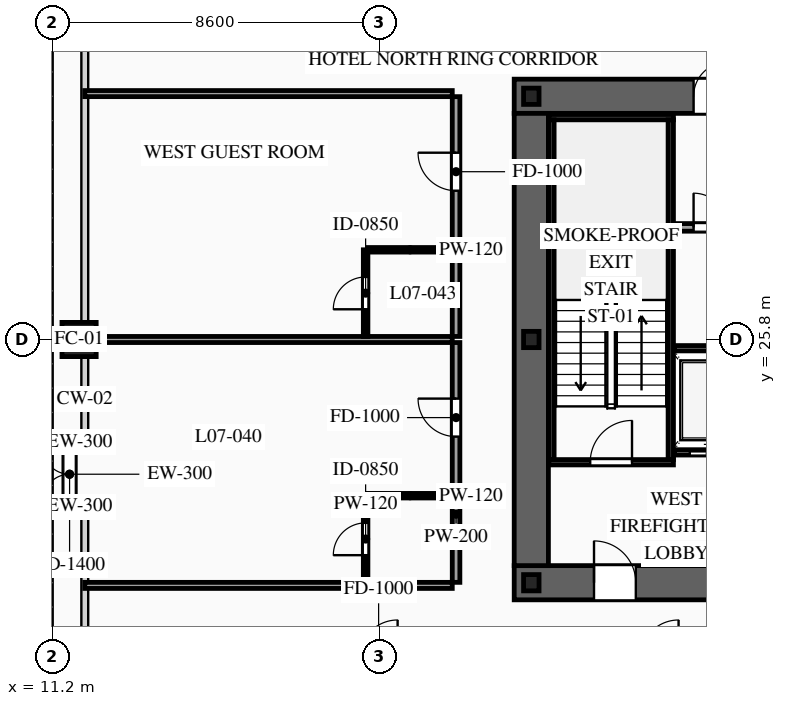
"""IFC4 building model, lengths in metres.
Left out: names, types, materials, properties, quantities, classifications, styles, units other than length and angle.
Written with IfcOpenShell. Run it as: python <this file> out.ifc"""

import sys

from ifc_helpers import new_model, si_unit, direction, frame, frame_2d, origin, origin_2d, place, context, subcontext, project, spatial, rectangle, hollow_rectangle, i_section, extrude, source, transform, mapped, element, fill, save


model = new_model("IFC4")
c1 = context("Model", 3, precision=1e-05, world=origin(), true_north=direction((0.0, 1.0)))
c2 = subcontext(c1, "Body", "Model", "MODEL_VIEW")
j1 = project(units=[si_unit("LENGTHUNIT", "METRE"), si_unit("PLANEANGLEUNIT", "RADIAN")], contexts=[c1])
p1 = place(None, origin())
s1 = spatial("IfcSite", under=j1, at=p1, CompositionType="ELEMENT")
p2 = place(p1, origin())
s2 = spatial("IfcBuilding", under=s1, at=p2, CompositionType="ELEMENT")
p3 = place(p2, frame((0.0, 0.0, 30.6)))
s3 = spatial("IfcBuildingStorey", under=s2, at=p3, CompositionType="ELEMENT", Elevation=30.6)
p4 = place(p3, frame((23.35, 19.4, 0.0), z_axis=(0.0, 0.0, 1.0), x_axis=(1.0, 0.0, 0.0)))
e1 = element("IfcWall", 1, at=p4, inside=s3, PredefinedType="SHEAR", context=c2, shape_type="SweptSolid", body=[
    extrude(rectangle(XDim=27.3, YDim=0.9, at=frame_2d((13.65, 0.0))), origin(), (0.0, 0.0, 1.0), 3.6),
])
p5 = place(p4, frame((2.1, 0.0, 0.0)))
e2 = element("IfcOpeningElement", 2, at=p5, cuts=e1, PredefinedType="OPENING", context=c2, shape_type="SweptSolid", body=[
    extrude(rectangle(XDim=1.1, YDim=2.2, at=frame_2d((0.55, 1.1))), frame((0.0, 0.465, 0.0), z_axis=(0.0, -1.0, 0.0), x_axis=(1.0, 0.0, 0.0)), (0.0, 0.0, 1.0), 0.93),
])
p6 = place(p4, frame((10.0, 0.0, 0.0)))
e3 = element("IfcOpeningElement", 3, at=p6, cuts=e1, PredefinedType="OPENING", context=c2, shape_type="SweptSolid", body=[
    extrude(rectangle(XDim=1.1, YDim=2.2, at=frame_2d((0.55, 1.1))), frame((0.0, 0.465, 0.0), z_axis=(0.0, -1.0, 0.0), x_axis=(1.0, 0.0, 0.0)), (0.0, 0.0, 1.0), 0.93),
])
p7 = place(p4, frame((23.2, 0.0, 0.0)))
e4 = element("IfcOpeningElement", 4, at=p7, cuts=e1, PredefinedType="OPENING", context=c2, shape_type="SweptSolid", body=[
    extrude(rectangle(XDim=1.1, YDim=2.2, at=frame_2d((0.55, 1.1))), frame((0.0, 0.465, 0.0), z_axis=(0.0, -1.0, 0.0), x_axis=(1.0, 0.0, 0.0)), (0.0, 0.0, 1.0), 0.93),
])
p8 = place(p4, frame((19.82, 0.0, 0.0)))
e5 = element("IfcOpeningElement", 5, at=p8, cuts=e1, PredefinedType="OPENING", context=c2, shape_type="SweptSolid", body=[
    extrude(rectangle(XDim=0.9, YDim=2.15, at=frame_2d((0.45, 1.075))), frame((0.0, 0.465, 0.0), z_axis=(0.0, -1.0, 0.0), x_axis=(1.0, 0.0, 0.0)), (0.0, 0.0, 1.0), 0.93),
])
p9 = place(p4, frame((18.38, 0.0, 0.0)))
e6 = element("IfcOpeningElement", 6, at=p9, cuts=e1, PredefinedType="OPENING", context=c2, shape_type="SweptSolid", body=[
    extrude(rectangle(XDim=0.9, YDim=2.15, at=frame_2d((0.45, 1.075))), frame((0.0, 0.465, 0.0), z_axis=(0.0, -1.0, 0.0), x_axis=(1.0, 0.0, 0.0)), (0.0, 0.0, 1.0), 0.93),
])
p10 = place(p3, frame((23.35, 32.2, 0.0), z_axis=(0.0, 0.0, 1.0), x_axis=(1.0, 0.0, 0.0)))
e7 = element("IfcWall", 7, at=p10, inside=s3, PredefinedType="SHEAR", context=c2, shape_type="SweptSolid", body=[
    extrude(rectangle(XDim=27.3, YDim=0.9, at=frame_2d((13.65, 0.0))), origin(), (0.0, 0.0, 1.0), 3.6),
])
p11 = place(p10, frame((4.72, 0.0, 0.0)))
e8 = element("IfcOpeningElement", 8, at=p11, cuts=e7, PredefinedType="OPENING", context=c2, shape_type="SweptSolid", body=[
    extrude(rectangle(XDim=0.9, YDim=2.15, at=frame_2d((0.45, 1.075))), frame((0.0, 0.465, 0.0), z_axis=(0.0, -1.0, 0.0), x_axis=(1.0, 0.0, 0.0)), (0.0, 0.0, 1.0), 0.93),
])
p12 = place(p10, frame((10.0, 0.0, 0.0)))
e9 = element("IfcOpeningElement", 9, at=p12, cuts=e7, PredefinedType="OPENING", context=c2, shape_type="SweptSolid", body=[
    extrude(rectangle(XDim=1.1, YDim=2.2, at=frame_2d((0.55, 1.1))), frame((0.0, 0.465, 0.0), z_axis=(0.0, -1.0, 0.0), x_axis=(1.0, 0.0, 0.0)), (0.0, 0.0, 1.0), 0.93),
])
p13 = place(p10, frame((15.85, 0.0, 0.0)))
e10 = element("IfcOpeningElement", 10, at=p13, cuts=e7, PredefinedType="OPENING", context=c2, shape_type="SweptSolid", body=[
    extrude(rectangle(XDim=1.1, YDim=2.2, at=frame_2d((0.55, 1.1))), frame((0.0, 0.465, 0.0), z_axis=(0.0, -1.0, 0.0), x_axis=(1.0, 0.0, 0.0)), (0.0, 0.0, 1.0), 0.93),
])
m1 = source(origin(), c2, "Body", "SweptSolid", [
    extrude(rectangle(XDim=11.9, YDim=0.9, at=frame_2d((5.95, 0.0))), origin(), (0.0, 0.0, 1.0), 3.6),
])
p14 = place(p3, frame((23.8, 19.85, 0.0), z_axis=(0.0, 0.0, 1.0), x_axis=(0.0, 1.0, 0.0)))
e11 = element("IfcWall", 11, at=p14, inside=s3, PredefinedType="SHEAR", context=c2, shape_type="MappedRepresentation", body=[
    mapped(m1, transform((0.0, 0.0, 0.0), scale=1.0)),
])
m2 = source(origin(), c2, "Body", "SweptSolid", [
    extrude(i_section(OverallWidth=0.407, OverallDepth=0.428, WebThickness=0.02, FlangeThickness=0.035, at=origin_2d()), origin(), (0.0, 0.0, 1.0), 3.6),
])
for number, where, z_axis, x_axis in (
    (12, (23.8, 19.4, 0.0), (0.0, 0.0, 1.0), (1.0, 0.0, 0.0)),
    (13, (23.8, 25.8, 0.0), (0.0, 0.0, 1.0), (1.0, 0.0, 0.0)),
    (14, (23.8, 32.2, 0.0), (0.0, 0.0, 1.0), (1.0, 0.0, 0.0)),
):
    element("IfcColumn", number, at=place(p3, frame(where, z_axis=z_axis, x_axis=x_axis)), inside=s3, PredefinedType="COLUMN", context=c2, shape_type="MappedRepresentation", body=[
        mapped(m2, transform((0.0, 0.0, 0.0), scale=1.0)),
    ])
m3 = source(origin(), c2, "Body", "SweptSolid", [
    extrude(hollow_rectangle(XDim=0.9, YDim=0.9, WallThickness=0.042, at=origin_2d()), origin(), (0.0, 0.0, 1.0), 3.6),
])
p15 = place(p3, frame((11.9, 25.8, 0.0), z_axis=(0.0, 0.0, 1.0), x_axis=(1.0, 0.0, 0.0)))
e15 = element("IfcColumn", 15, at=p15, inside=s3, PredefinedType="COLUMN", context=c2, shape_type="MappedRepresentation", body=[
    mapped(m3, transform((0.0, 0.0, 0.0), scale=1.0)),
])
p16 = place(p3, frame((11.65, 21.255, 0.0), z_axis=(0.0, 0.0, 1.0), x_axis=(0.0, 1.0, 0.0)))
e16 = element("IfcWall", 16, at=p16, inside=s3, PredefinedType="SOLIDWALL", context=c2, shape_type="SweptSolid", body=[
    extrude(rectangle(XDim=2.0, YDim=0.3, at=frame_2d((1.0, 0.0))), origin(), (0.0, 0.0, 1.0), 3.38),
])
p17 = place(p16, frame((0.3, 0.0, 0.0)))
e17 = element("IfcOpeningElement", 17, at=p17, cuts=e16, PredefinedType="OPENING", context=c2, shape_type="SweptSolid", body=[
    extrude(rectangle(XDim=1.4, YDim=2.3, at=frame_2d((0.7, 1.15))), frame((0.0, 0.165, 0.0), z_axis=(0.0, -1.0, 0.0), x_axis=(1.0, 0.0, 0.0)), (0.0, 0.0, 1.0), 0.33),
])
m4 = source(origin(), c2, "Body", "SweptSolid", [
    extrude(rectangle(XDim=0.25, YDim=0.3, at=frame_2d((0.125, 0.0))), origin(), (0.0, 0.0, 1.0), 3.38),
])
for number, where, z_axis, x_axis in (
    (18, (12.05, 21.405, 0.0), (0.0, 0.0, 1.0), (-1.0, 0.0, 0.0)),
    (19, (11.8, 23.105, 0.0), (0.0, 0.0, 1.0), (1.0, 0.0, 0.0)),
):
    element("IfcWall", number, at=place(p3, frame(where, z_axis=z_axis, x_axis=x_axis)), inside=s3, PredefinedType="SOLIDWALL", context=c2, shape_type="MappedRepresentation", body=[
        mapped(m4, transform((0.0, 0.0, 0.0), scale=1.0)),
    ])
p18 = place(p3, frame((27.56, 22.83, 0.0), z_axis=(0.0, 0.0, 1.0), x_axis=(1.0, 0.0, 0.0)))
e20 = element("IfcWall", 20, at=p18, inside=s3, PredefinedType="SOLIDWALL", context=c2, shape_type="SweptSolid", body=[
    extrude(rectangle(XDim=1.92, YDim=0.14, at=frame_2d((0.96, 0.0))), origin(), (0.0, 0.0, 1.0), 3.38),
])
p19 = place(p18, frame((0.41, 0.0, 0.0)))
e21 = element("IfcOpeningElement", 21, at=p19, cuts=e20, PredefinedType="OPENING", context=c2, shape_type="SweptSolid", body=[
    extrude(rectangle(XDim=1.1, YDim=2.2, at=frame_2d((0.55, 1.1))), frame((0.0, 0.085, 0.0), z_axis=(0.0, -1.0, 0.0), x_axis=(1.0, 0.0, 0.0)), (0.0, 0.0, 1.0), 0.17),
])
m5 = source(origin(), c2, "Body", "SweptSolid", [
    extrude(rectangle(XDim=1.92, YDim=0.14, at=frame_2d((0.96, 0.0))), origin(), (0.0, 0.0, 1.0), 3.38),
])
p20 = place(p3, frame((27.56, 25.57, 0.0), z_axis=(0.0, 0.0, 1.0), x_axis=(1.0, 0.0, 0.0)))
e22 = element("IfcWall", 22, at=p20, inside=s3, PredefinedType="SOLIDWALL", context=c2, shape_type="MappedRepresentation", body=[
    mapped(m5, transform((0.0, 0.0, 0.0), scale=1.0)),
])
p21 = place(p3, frame((24.26, 22.57, 0.0), z_axis=(0.0, 0.0, 1.0), x_axis=(1.0, 0.0, 0.0)))
e23 = element("IfcWall", 23, at=p21, inside=s3, PredefinedType="SOLIDWALL", context=c2, shape_type="SweptSolid", body=[
    extrude(rectangle(XDim=3.28, YDim=0.14, at=frame_2d((1.64, 0.0))), origin(), (0.0, 0.0, 1.0), 3.38),
])
p22 = place(p21, frame((1.09, 0.0, 0.0)))
e24 = element("IfcOpeningElement", 24, at=p22, cuts=e23, PredefinedType="OPENING", context=c2, shape_type="SweptSolid", body=[
    extrude(rectangle(XDim=1.1, YDim=2.2, at=frame_2d((0.55, 1.1))), frame((0.0, 0.085, 0.0), z_axis=(0.0, -1.0, 0.0), x_axis=(1.0, 0.0, 0.0)), (0.0, 0.0, 1.0), 0.17),
])
m6 = source(origin(), c2, "Body", "SweptSolid", [
    extrude(rectangle(XDim=3.28, YDim=0.14, at=frame_2d((1.64, 0.0))), origin(), (0.0, 0.0, 1.0), 3.38),
])
p23 = place(p3, frame((24.26, 31.65, 0.0), z_axis=(0.0, 0.0, 1.0), x_axis=(1.0, 0.0, 0.0)))
e25 = element("IfcWall", 25, at=p23, inside=s3, PredefinedType="SOLIDWALL", context=c2, shape_type="MappedRepresentation", body=[
    mapped(m6, transform((0.0, 0.0, 0.0), scale=1.0)),
])
m7 = source(origin(), c2, "Body", "SweptSolid", [
    extrude(rectangle(XDim=8.94, YDim=0.14, at=frame_2d((4.47, 0.0))), origin(), (0.0, 0.0, 1.0), 3.38),
])
for number, where, z_axis, x_axis in (
    (26, (24.33, 22.64, 0.0), (0.0, 0.0, 1.0), (0.0, 1.0, 0.0)),
    (27, (27.47, 22.64, 0.0), (0.0, 0.0, 1.0), (0.0, 1.0, 0.0)),
):
    element("IfcWall", number, at=place(p3, frame(where, z_axis=z_axis, x_axis=x_axis)), inside=s3, PredefinedType="SOLIDWALL", context=c2, shape_type="MappedRepresentation", body=[
        mapped(m7, transform((0.0, 0.0, 0.0), scale=1.0)),
    ])
p24 = place(p3, frame((27.56, 28.75, 0.0), z_axis=(0.0, 0.0, 1.0), x_axis=(1.0, 0.0, 0.0)))
e28 = element("IfcWall", 28, at=p24, inside=s3, PredefinedType="PARTITIONING", context=c2, shape_type="SweptSolid", body=[
    extrude(rectangle(XDim=1.92, YDim=0.2, at=frame_2d((0.96, 0.0))), origin(), (0.0, 0.0, 1.0), 3.38),
])
p25 = place(p24, frame((0.51, 0.0, 0.0)))
e29 = element("IfcOpeningElement", 29, at=p25, cuts=e28, PredefinedType="OPENING", context=c2, shape_type="SweptSolid", body=[
    extrude(rectangle(XDim=0.9, YDim=2.15, at=frame_2d((0.45, 1.075))), frame((0.0, 0.115, 0.0), z_axis=(0.0, -1.0, 0.0), x_axis=(1.0, 0.0, 0.0)), (0.0, 0.0, 1.0), 0.23),
])
p26 = place(p3, frame((21.82, 19.41, 0.0), z_axis=(0.0, 0.0, 1.0), x_axis=(0.0, 1.0, 0.0)))
e30 = element("IfcWall", 30, at=p26, inside=s3, PredefinedType="PARTITIONING", context=c2, shape_type="SweptSolid", body=[
    extrude(rectangle(XDim=6.31, YDim=0.2, at=frame_2d((3.155, 0.0))), origin(), (0.0, 0.0, 1.0), 3.38),
])
p27 = place(p26, frame((3.835, 0.0, 0.0)))
e31 = element("IfcOpeningElement", 31, at=p27, cuts=e30, PredefinedType="OPENING", context=c2, shape_type="SweptSolid", body=[
    extrude(rectangle(XDim=1.0, YDim=2.2, at=frame_2d((0.5, 1.1))), frame((0.0, 0.115, 0.0), z_axis=(0.0, -1.0, 0.0), x_axis=(1.0, 0.0, 0.0)), (0.0, 0.0, 1.0), 0.23),
])
m8 = source(origin(), c2, "Body", "SweptSolid", [
    extrude(rectangle(XDim=9.67, YDim=0.16, at=frame_2d((4.835, 0.0))), origin(), (0.0, 0.0, 1.0), 2.575),
])
p28 = place(p3, frame((12.05, 25.8, 0.0), z_axis=(0.0, 0.0, 1.0), x_axis=(1.0, 0.0, 0.0)))
e32 = element("IfcWall", 32, at=p28, inside=s3, PredefinedType="PARTITIONING", context=c2, shape_type="MappedRepresentation", body=[
    mapped(m8, transform((0.0, 0.0, 0.0), scale=1.0)),
])
m9 = source(origin(), c2, "Body", "SweptSolid", [
    extrude(rectangle(XDim=9.67, YDim=0.16, at=frame_2d((4.835, 0.0))), origin(), (0.0, 0.0, 1.0), 2.875),
])
p29 = place(p3, frame((12.05, 19.33, 0.0), z_axis=(0.0, 0.0, 1.0), x_axis=(1.0, 0.0, 0.0)))
e33 = element("IfcWall", 33, at=p29, inside=s3, PredefinedType="PARTITIONING", context=c2, shape_type="MappedRepresentation", body=[
    mapped(m9, transform((0.0, 0.0, 0.0), scale=1.0)),
])
p30 = place(p3, frame((19.44, 19.41, 0.0), z_axis=(0.0, 0.0, 1.0), x_axis=(0.0, 1.0, 0.0)))
e34 = element("IfcWall", 34, at=p30, inside=s3, PredefinedType="PARTITIONING", context=c2, shape_type="SweptSolid", body=[
    extrude(rectangle(XDim=2.28, YDim=0.12, at=frame_2d((1.14, 0.0))), origin(), (0.0, 0.0, 1.0), 3.38),
])
p31 = place(p30, frame((0.715, 0.0, 0.0)))
e35 = element("IfcOpeningElement", 35, at=p31, cuts=e34, PredefinedType="OPENING", context=c2, shape_type="SweptSolid", body=[
    extrude(rectangle(XDim=0.85, YDim=2.1, at=frame_2d((0.425, 1.05))), frame((0.0, 0.075, 0.0), z_axis=(0.0, -1.0, 0.0), x_axis=(1.0, 0.0, 0.0)), (0.0, 0.0, 1.0), 0.15),
])
m10 = source(origin(), c2, "Body", "SweptSolid", [
    extrude(rectangle(XDim=2.22, YDim=0.12, at=frame_2d((1.11, 0.0))), origin(), (0.0, 0.0, 1.0), 3.38),
])
p32 = place(p3, frame((19.5, 21.69, 0.0), z_axis=(0.0, 0.0, 1.0), x_axis=(1.0, 0.0, 0.0)))
e36 = element("IfcWall", 36, at=p32, inside=s3, PredefinedType="PARTITIONING", context=c2, shape_type="MappedRepresentation", body=[
    mapped(m10, transform((0.0, 0.0, 0.0), scale=1.0)),
])
p33 = place(p3, frame((21.82, 25.88, 0.0), z_axis=(0.0, 0.0, 1.0), x_axis=(0.0, 1.0, 0.0)))
e37 = element("IfcWall", 37, at=p33, inside=s3, PredefinedType="PARTITIONING", context=c2, shape_type="SweptSolid", body=[
    extrude(rectangle(XDim=6.31, YDim=0.2, at=frame_2d((3.155, 0.0))), origin(), (0.0, 0.0, 1.0), 3.38),
])
p34 = place(p33, frame((3.835, 0.0, 0.0)))
e38 = element("IfcOpeningElement", 38, at=p34, cuts=e37, PredefinedType="OPENING", context=c2, shape_type="SweptSolid", body=[
    extrude(rectangle(XDim=1.0, YDim=2.2, at=frame_2d((0.5, 1.1))), frame((0.0, 0.115, 0.0), z_axis=(0.0, -1.0, 0.0), x_axis=(1.0, 0.0, 0.0)), (0.0, 0.0, 1.0), 0.23),
])
p35 = place(p3, frame((12.05, 32.27, 0.0), z_axis=(0.0, 0.0, 1.0), x_axis=(1.0, 0.0, 0.0)))
e39 = element("IfcWall", 39, at=p35, inside=s3, PredefinedType="PARTITIONING", context=c2, shape_type="MappedRepresentation", body=[
    mapped(m9, transform((0.0, 0.0, 0.0), scale=1.0)),
])
p36 = place(p3, frame((19.44, 25.88, 0.0), z_axis=(0.0, 0.0, 1.0), x_axis=(0.0, 1.0, 0.0)))
e40 = element("IfcWall", 40, at=p36, inside=s3, PredefinedType="PARTITIONING", context=c2, shape_type="SweptSolid", body=[
    extrude(rectangle(XDim=2.28, YDim=0.12, at=frame_2d((1.14, 0.0))), origin(), (0.0, 0.0, 1.0), 3.38),
])
p37 = place(p36, frame((0.715, 0.0, 0.0)))
e41 = element("IfcOpeningElement", 41, at=p37, cuts=e40, PredefinedType="OPENING", context=c2, shape_type="SweptSolid", body=[
    extrude(rectangle(XDim=0.85, YDim=2.1, at=frame_2d((0.425, 1.05))), frame((0.0, 0.075, 0.0), z_axis=(0.0, -1.0, 0.0), x_axis=(1.0, 0.0, 0.0)), (0.0, 0.0, 1.0), 0.15),
])
p38 = place(p3, frame((19.5, 28.16, 0.0), z_axis=(0.0, 0.0, 1.0), x_axis=(1.0, 0.0, 0.0)))
e42 = element("IfcWall", 42, at=p38, inside=s3, PredefinedType="PARTITIONING", context=c2, shape_type="MappedRepresentation", body=[
    mapped(m10, transform((0.0, 0.0, 0.0), scale=1.0)),
])
m11 = source(origin(), c2, "Body", "SweptSolid", [
    extrude(rectangle(XDim=1.4, YDim=2.3, at=frame_2d((0.7, 1.15))), frame((0.0, 0.025, 0.0), z_axis=(0.0, -1.0, 0.0), x_axis=(1.0, 0.0, 0.0)), (0.0, 0.0, 1.0), 0.05),
])
p39 = place(p17, origin())
e43 = element("IfcDoor", 43, at=p39, inside=s3, OperationType="DOUBLE_DOOR_SINGLE_SWING", PredefinedType="DOOR", context=c2, shape_type="MappedRepresentation", body=[
    mapped(m11, transform((0.0, 0.0, 0.0), scale=1.0)),
])
fill(e17, e43)
m12 = source(origin(), c2, "Body", "SweptSolid", [
    extrude(rectangle(XDim=1.1, YDim=2.2, at=frame_2d((0.55, 1.1))), frame((0.0, 0.025, 0.0), z_axis=(0.0, -1.0, 0.0), x_axis=(1.0, 0.0, 0.0)), (0.0, 0.0, 1.0), 0.05),
])
p40 = place(p19, origin())
e44 = element("IfcDoor", 44, at=p40, inside=s3, OperationType="SLIDING_TO_LEFT", PredefinedType="DOOR", context=c2, shape_type="MappedRepresentation", body=[
    mapped(m12, transform((0.0, 0.0, 0.0), scale=1.0)),
])
fill(e21, e44)
m13 = source(origin(), c2, "Body", "SweptSolid", [
    extrude(rectangle(XDim=1.1, YDim=2.2, at=frame_2d((0.55, 1.1))), frame((0.0, 0.025, 0.0), z_axis=(0.0, -1.0, 0.0), x_axis=(1.0, 0.0, 0.0)), (0.0, 0.0, 1.0), 0.05),
])
p41 = place(p22, origin())
e45 = element("IfcDoor", 45, at=p41, inside=s3, OperationType="SINGLE_SWING_RIGHT", PredefinedType="DOOR", context=c2, shape_type="MappedRepresentation", body=[
    mapped(m13, transform((0.0, 0.0, 0.0), scale=1.0)),
])
fill(e24, e45)
p42 = place(p5, origin())
e46 = element("IfcDoor", 46, at=p42, inside=s3, OperationType="SINGLE_SWING_LEFT", PredefinedType="DOOR", context=c2, shape_type="MappedRepresentation", body=[
    mapped(m13, transform((0.0, 0.0, 0.0), scale=1.0)),
])
fill(e2, e46)
m14 = source(origin(), c2, "Body", "SweptSolid", [
    extrude(rectangle(XDim=0.9, YDim=2.15, at=frame_2d((0.45, 1.075))), frame((0.0, 0.025, 0.0), z_axis=(0.0, -1.0, 0.0), x_axis=(1.0, 0.0, 0.0)), (0.0, 0.0, 1.0), 0.05),
])
p43 = place(p11, origin())
e47 = element("IfcDoor", 47, at=p43, inside=s3, OperationType="SINGLE_SWING_RIGHT", PredefinedType="DOOR", context=c2, shape_type="MappedRepresentation", body=[
    mapped(m14, transform((0.0, 0.0, 0.0), scale=1.0)),
])
fill(e8, e47)
p44 = place(p25, origin())
e48 = element("IfcDoor", 48, at=p44, inside=s3, OperationType="SINGLE_SWING_LEFT", PredefinedType="DOOR", context=c2, shape_type="MappedRepresentation", body=[
    mapped(m14, transform((0.0, 0.0, 0.0), scale=1.0)),
])
fill(e29, e48)
m15 = source(origin(), c2, "Body", "SweptSolid", [
    extrude(rectangle(XDim=1.0, YDim=2.2, at=frame_2d((0.5, 1.1))), frame((0.0, 0.025, 0.0), z_axis=(0.0, -1.0, 0.0), x_axis=(1.0, 0.0, 0.0)), (0.0, 0.0, 1.0), 0.05),
])
p45 = place(p27, origin())
e49 = element("IfcDoor", 49, at=p45, inside=s3, OperationType="SINGLE_SWING_RIGHT", PredefinedType="DOOR", context=c2, shape_type="MappedRepresentation", body=[
    mapped(m15, transform((0.0, 0.0, 0.0), scale=1.0)),
])
fill(e31, e49)
m16 = source(origin(), c2, "Body", "SweptSolid", [
    extrude(rectangle(XDim=0.85, YDim=2.1, at=frame_2d((0.425, 1.05))), frame((0.0, 0.025, 0.0), z_axis=(0.0, -1.0, 0.0), x_axis=(1.0, 0.0, 0.0)), (0.0, 0.0, 1.0), 0.05),
])
p46 = place(p31, origin())
e50 = element("IfcDoor", 50, at=p46, inside=s3, OperationType="SINGLE_SWING_LEFT", PredefinedType="DOOR", context=c2, shape_type="MappedRepresentation", body=[
    mapped(m16, transform((0.0, 0.0, 0.0), scale=1.0)),
])
fill(e35, e50)
p47 = place(p34, origin())
e51 = element("IfcDoor", 51, at=p47, inside=s3, OperationType="SINGLE_SWING_RIGHT", PredefinedType="DOOR", context=c2, shape_type="MappedRepresentation", body=[
    mapped(m15, transform((0.0, 0.0, 0.0), scale=1.0)),
])
fill(e38, e51)
p48 = place(p37, origin())
e52 = element("IfcDoor", 52, at=p48, inside=s3, OperationType="SINGLE_SWING_LEFT", PredefinedType="DOOR", context=c2, shape_type="MappedRepresentation", body=[
    mapped(m16, transform((0.0, 0.0, 0.0), scale=1.0)),
])
fill(e41, e52)
save(model, sys.argv[1])
